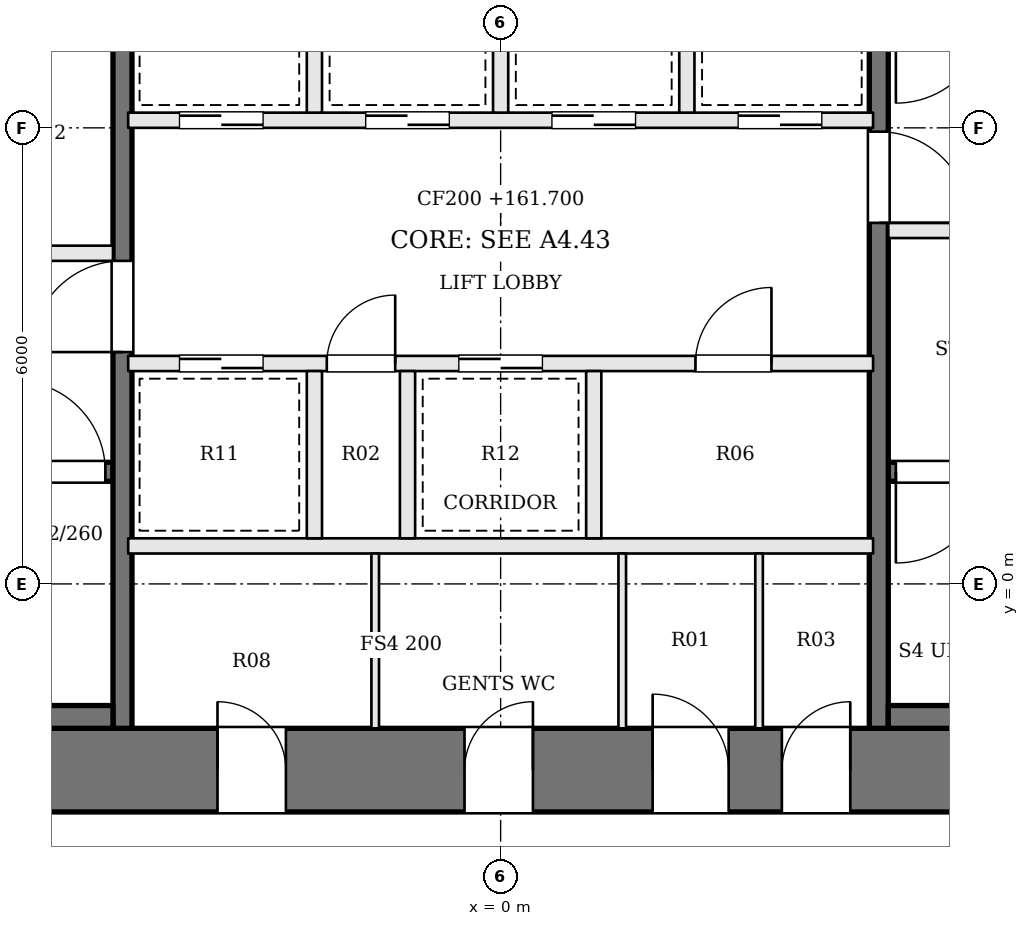
"""IFC4 building model, lengths in metres.
Left out: names, types, materials, properties, quantities, classifications, styles, units other than length and angle.
Written with IfcOpenShell. Run it as: python <this file> out.ifc"""

import sys

from ifc_helpers import new_model, si_unit, direction, frame, frame_2d, origin, place, context, subcontext, project, spatial, rectangle, extrude, element, fill, save


model = new_model("IFC4")
c1 = context("Model", 3, precision=1e-05, world=origin(), true_north=direction((0.0, 1.0)))
c2 = subcontext(c1, "Body", "Model", "MODEL_VIEW")
j1 = project(units=[si_unit("LENGTHUNIT", "METRE"), si_unit("PLANEANGLEUNIT", "RADIAN")], contexts=[c1])
p1 = place(None, origin())
s1 = spatial("IfcSite", under=j1, at=p1, CompositionType="ELEMENT")
p2 = place(p1, origin())
s2 = spatial("IfcBuilding", under=s1, at=p2, CompositionType="ELEMENT")
p3 = place(p2, frame((0.0, 0.0, 161.7)))
s3 = spatial("IfcBuildingStorey", under=s2, at=p3, CompositionType="ELEMENT", Elevation=161.7)
p4 = place(p3, frame((-13.0, -2.45, 0.0), z_axis=(0.0, 0.0, 1.0), x_axis=(1.0, 0.0, 0.0)))
e1 = element("IfcWall", 1, at=p4, inside=s3, PredefinedType="SHEAR", context=c2, shape_type="SweptSolid", body=[
    extrude(rectangle(XDim=26.0, YDim=1.1, at=frame_2d((13.0, 0.0))), origin(), (0.0, 0.0, 1.0), 3.9),
])
p5 = place(p4, frame((9.275, 0.0, 0.0)))
e2 = element("IfcOpeningElement", 2, at=p5, cuts=e1, PredefinedType="OPENING", context=c2, shape_type="SweptSolid", body=[
    extrude(rectangle(XDim=0.9, YDim=2.1, at=frame_2d((0.45, 1.05))), frame((0.0, 0.56, 0.0), z_axis=(0.0, -1.0, 0.0), x_axis=(1.0, 0.0, 0.0)), (0.0, 0.0, 1.0), 1.12),
])
p6 = place(p4, frame((12.525, 0.0, 0.0)))
e3 = element("IfcOpeningElement", 3, at=p6, cuts=e1, PredefinedType="OPENING", context=c2, shape_type="SweptSolid", body=[
    extrude(rectangle(XDim=0.9, YDim=2.1, at=frame_2d((0.45, 1.05))), frame((0.0, 0.56, 0.0), z_axis=(0.0, -1.0, 0.0), x_axis=(1.0, 0.0, 0.0)), (0.0, 0.0, 1.0), 1.12),
])
p7 = place(p4, frame((15.0, 0.0, 0.0)))
e4 = element("IfcOpeningElement", 4, at=p7, cuts=e1, PredefinedType="OPENING", context=c2, shape_type="SweptSolid", body=[
    extrude(rectangle(XDim=1.0, YDim=2.1, at=frame_2d((0.5, 1.05))), frame((0.0, 0.56, 0.0), z_axis=(0.0, -1.0, 0.0), x_axis=(1.0, 0.0, 0.0)), (0.0, 0.0, 1.0), 1.12),
])
p8 = place(p4, frame((16.7, 0.0, 0.0)))
e5 = element("IfcOpeningElement", 5, at=p8, cuts=e1, PredefinedType="OPENING", context=c2, shape_type="SweptSolid", body=[
    extrude(rectangle(XDim=0.9, YDim=2.1, at=frame_2d((0.45, 1.05))), frame((0.0, 0.56, 0.0), z_axis=(0.0, -1.0, 0.0), x_axis=(1.0, 0.0, 0.0)), (0.0, 0.0, 1.0), 1.12),
])
p9 = place(p3, frame((-11.9, 1.475, 0.0), z_axis=(0.0, 0.0, 1.0), x_axis=(1.0, 0.0, 0.0)))
e6 = element("IfcWall", 6, at=p9, inside=s3, PredefinedType="SOLIDWALL", context=c2, shape_type="SweptSolid", body=[
    extrude(rectangle(XDim=6.8, YDim=0.25, at=frame_2d((3.4, 0.0))), origin(), (0.0, 0.0, 1.0), 3.7),
])
p10 = place(p9, frame((5.5, 0.0, 0.0)))
e7 = element("IfcOpeningElement", 7, at=p10, cuts=e6, PredefinedType="OPENING", context=c2, shape_type="SweptSolid", body=[
    extrude(rectangle(XDim=1.2, YDim=2.1, at=frame_2d((0.6, 1.05))), frame((0.0, 0.135, 0.0), z_axis=(0.0, -1.0, 0.0), x_axis=(1.0, 0.0, 0.0)), (0.0, 0.0, 1.0), 0.27),
])
p11 = place(p3, frame((-11.9, 4.35, 0.0), z_axis=(0.0, 0.0, 1.0), x_axis=(1.0, 0.0, 0.0)))
e8 = element("IfcWall", 8, at=p11, inside=s3, PredefinedType="SOLIDWALL", context=c2, shape_type="SweptSolid", body=[
    extrude(rectangle(XDim=6.8, YDim=0.2, at=frame_2d((3.4, 0.0))), origin(), (0.0, 0.0, 1.0), 3.7),
])
p12 = place(p11, frame((4.1, 0.0, 0.0)))
e9 = element("IfcOpeningElement", 9, at=p12, cuts=e8, PredefinedType="OPENING", context=c2, shape_type="SweptSolid", body=[
    extrude(rectangle(XDim=1.2, YDim=2.1, at=frame_2d((0.6, 1.05))), frame((0.0, 0.11, 0.0), z_axis=(0.0, -1.0, 0.0), x_axis=(1.0, 0.0, 0.0)), (0.0, 0.0, 1.0), 0.22),
])
p13 = place(p11, frame((0.8, 0.0, 0.0)))
e10 = element("IfcOpeningElement", 10, at=p13, cuts=e8, PredefinedType="OPENING", context=c2, shape_type="SweptSolid", body=[
    extrude(rectangle(XDim=1.2, YDim=2.1, at=frame_2d((0.6, 1.05))), frame((0.0, 0.11, 0.0), z_axis=(0.0, -1.0, 0.0), x_axis=(1.0, 0.0, 0.0)), (0.0, 0.0, 1.0), 0.22),
])
p14 = place(p3, frame((11.9, 4.65, 0.0), z_axis=(0.0, 0.0, 1.0), x_axis=(-1.0, 0.0, 0.0)))
e11 = element("IfcWall", 11, at=p14, inside=s3, PredefinedType="SOLIDWALL", context=c2, shape_type="SweptSolid", body=[
    extrude(rectangle(XDim=6.8, YDim=0.2, at=frame_2d((3.4, 0.0))), origin(), (0.0, 0.0, 1.0), 3.7),
])
p15 = place(p14, frame((4.1, 0.0, 0.0)))
e12 = element("IfcOpeningElement", 12, at=p15, cuts=e11, PredefinedType="OPENING", context=c2, shape_type="SweptSolid", body=[
    extrude(rectangle(XDim=1.2, YDim=2.1, at=frame_2d((0.6, 1.05))), frame((0.0, 0.11, 0.0), z_axis=(0.0, -1.0, 0.0), x_axis=(1.0, 0.0, 0.0)), (0.0, 0.0, 1.0), 0.22),
])
p16 = place(p14, frame((0.8, 0.0, 0.0)))
e13 = element("IfcOpeningElement", 13, at=p16, cuts=e11, PredefinedType="OPENING", context=c2, shape_type="SweptSolid", body=[
    extrude(rectangle(XDim=1.2, YDim=2.1, at=frame_2d((0.6, 1.05))), frame((0.0, 0.11, 0.0), z_axis=(0.0, -1.0, 0.0), x_axis=(1.0, 0.0, 0.0)), (0.0, 0.0, 1.0), 0.22),
])
p17 = place(p3, frame((11.9, 1.475, 0.0), z_axis=(0.0, 0.0, 1.0), x_axis=(-1.0, 0.0, 0.0)))
e14 = element("IfcWall", 14, at=p17, inside=s3, PredefinedType="SOLIDWALL", context=c2, shape_type="SweptSolid", body=[
    extrude(rectangle(XDim=6.8, YDim=0.25, at=frame_2d((3.4, 0.0))), origin(), (0.0, 0.0, 1.0), 3.7),
])
p18 = place(p17, frame((5.5, 0.0, 0.0)))
e15 = element("IfcOpeningElement", 15, at=p18, cuts=e14, PredefinedType="OPENING", context=c2, shape_type="SweptSolid", body=[
    extrude(rectangle(XDim=1.2, YDim=2.1, at=frame_2d((0.6, 1.05))), frame((0.0, 0.135, 0.0), z_axis=(0.0, -1.0, 0.0), x_axis=(1.0, 0.0, 0.0)), (0.0, 0.0, 1.0), 0.27),
])
p19 = place(p3, frame((-4.975, -1.9, 0.0), z_axis=(0.0, 0.0, 1.0), x_axis=(0.0, 1.0, 0.0)))
e16 = element("IfcWall", 16, at=p19, inside=s3, PredefinedType="SOLIDWALL", context=c2, shape_type="SweptSolid", body=[
    extrude(rectangle(XDim=12.8, YDim=0.25, at=frame_2d((6.4, 0.0))), origin(), (0.0, 0.0, 1.0), 3.7),
])
p20 = place(p19, frame((4.95, 0.0, 0.0)))
e17 = element("IfcOpeningElement", 17, at=p20, cuts=e16, PredefinedType="OPENING", context=c2, shape_type="SweptSolid", body=[
    extrude(rectangle(XDim=1.2, YDim=2.1, at=frame_2d((0.6, 1.05))), frame((0.0, 0.135, 0.0), z_axis=(0.0, -1.0, 0.0), x_axis=(1.0, 0.0, 0.0)), (0.0, 0.0, 1.0), 0.27),
])
p21 = place(p3, frame((4.975, 10.9, 0.0), z_axis=(0.0, 0.0, 1.0), x_axis=(0.0, -1.0, 0.0)))
e18 = element("IfcWall", 18, at=p21, inside=s3, PredefinedType="SOLIDWALL", context=c2, shape_type="SweptSolid", body=[
    extrude(rectangle(XDim=12.8, YDim=0.25, at=frame_2d((6.4, 0.0))), origin(), (0.0, 0.0, 1.0), 3.7),
])
p22 = place(p21, frame((4.95, 0.0, 0.0)))
e19 = element("IfcOpeningElement", 19, at=p22, cuts=e18, PredefinedType="OPENING", context=c2, shape_type="SweptSolid", body=[
    extrude(rectangle(XDim=1.2, YDim=2.1, at=frame_2d((0.6, 1.05))), frame((0.0, 0.135, 0.0), z_axis=(0.0, -1.0, 0.0), x_axis=(1.0, 0.0, 0.0)), (0.0, 0.0, 1.0), 0.27),
])
for number, where, z_axis, x_axis in (
    (20, (-11.9, -1.75, 0.0), (0.0, 0.0, 1.0), (1.0, 0.0, 0.0)),
    (21, (11.9, -1.75, 0.0), (0.0, 0.0, 1.0), (-1.0, 0.0, 0.0)),
):
    element("IfcWall", number, at=place(p3, frame(where, z_axis=z_axis, x_axis=x_axis)), inside=s3, PredefinedType="SOLIDWALL", context=c2, shape_type="SweptSolid", body=[
        extrude(rectangle(XDim=6.8, YDim=0.3, at=frame_2d((3.4, 0.0))), origin(), (0.0, 0.0, 1.0), 3.7),
    ])
p23 = place(p3, frame((-4.9, 0.5, 0.0), z_axis=(0.0, 0.0, 1.0), x_axis=(1.0, 0.0, 0.0)))
e22 = element("IfcWall", 22, at=p23, inside=s3, PredefinedType="SOLIDWALL", context=c2, shape_type="SweptSolid", body=[
    extrude(rectangle(XDim=9.8, YDim=0.2, at=frame_2d((4.9, 0.0))), origin(), (0.0, 0.0, 1.0), 3.7),
])
p24 = place(p3, frame((-4.9, 2.9, 0.0), z_axis=(0.0, 0.0, 1.0), x_axis=(1.0, 0.0, 0.0)))
e23 = element("IfcWall", 23, at=p24, inside=s3, PredefinedType="SOLIDWALL", context=c2, shape_type="SweptSolid", body=[
    extrude(rectangle(XDim=9.8, YDim=0.2, at=frame_2d((4.9, 0.0))), origin(), (0.0, 0.0, 1.0), 3.7),
])
p25 = place(p24, frame((0.675, 0.0, 0.0)))
e24 = element("IfcOpeningElement", 24, at=p25, cuts=e23, PredefinedType="OPENING", context=c2, shape_type="SweptSolid", body=[
    extrude(rectangle(XDim=1.1, YDim=2.1, at=frame_2d((0.55, 1.05))), frame((0.0, 0.11, 0.0), z_axis=(0.0, -1.0, 0.0), x_axis=(1.0, 0.0, 0.0)), (0.0, 0.0, 1.0), 0.22),
])
p26 = place(p24, frame((2.613, 0.0, 0.0)))
e25 = element("IfcOpeningElement", 25, at=p26, cuts=e23, PredefinedType="OPENING", context=c2, shape_type="SweptSolid", body=[
    extrude(rectangle(XDim=0.9, YDim=2.1, at=frame_2d((0.45, 1.05))), frame((0.0, 0.11, 0.0), z_axis=(0.0, -1.0, 0.0), x_axis=(1.0, 0.0, 0.0)), (0.0, 0.0, 1.0), 0.22),
])
p27 = place(p24, frame((4.35, 0.0, 0.0)))
e26 = element("IfcOpeningElement", 26, at=p27, cuts=e23, PredefinedType="OPENING", context=c2, shape_type="SweptSolid", body=[
    extrude(rectangle(XDim=1.1, YDim=2.1, at=frame_2d((0.55, 1.05))), frame((0.0, 0.11, 0.0), z_axis=(0.0, -1.0, 0.0), x_axis=(1.0, 0.0, 0.0)), (0.0, 0.0, 1.0), 0.22),
])
p28 = place(p24, frame((7.463, 0.0, 0.0)))
e27 = element("IfcOpeningElement", 27, at=p28, cuts=e23, PredefinedType="OPENING", context=c2, shape_type="SweptSolid", body=[
    extrude(rectangle(XDim=1.0, YDim=2.1, at=frame_2d((0.5, 1.05))), frame((0.0, 0.11, 0.0), z_axis=(0.0, -1.0, 0.0), x_axis=(1.0, 0.0, 0.0)), (0.0, 0.0, 1.0), 0.22),
])
p29 = place(p3, frame((-4.9, 6.1, 0.0), z_axis=(0.0, 0.0, 1.0), x_axis=(1.0, 0.0, 0.0)))
e28 = element("IfcWall", 28, at=p29, inside=s3, PredefinedType="SOLIDWALL", context=c2, shape_type="SweptSolid", body=[
    extrude(rectangle(XDim=9.8, YDim=0.2, at=frame_2d((4.9, 0.0))), origin(), (0.0, 0.0, 1.0), 3.7),
])
p30 = place(p29, frame((0.675, 0.0, 0.0)))
e29 = element("IfcOpeningElement", 29, at=p30, cuts=e28, PredefinedType="OPENING", context=c2, shape_type="SweptSolid", body=[
    extrude(rectangle(XDim=1.1, YDim=2.1, at=frame_2d((0.55, 1.05))), frame((0.0, 0.11, 0.0), z_axis=(0.0, -1.0, 0.0), x_axis=(1.0, 0.0, 0.0)), (0.0, 0.0, 1.0), 0.22),
])
p31 = place(p29, frame((3.125, 0.0, 0.0)))
e30 = element("IfcOpeningElement", 30, at=p31, cuts=e28, PredefinedType="OPENING", context=c2, shape_type="SweptSolid", body=[
    extrude(rectangle(XDim=1.1, YDim=2.1, at=frame_2d((0.55, 1.05))), frame((0.0, 0.11, 0.0), z_axis=(0.0, -1.0, 0.0), x_axis=(1.0, 0.0, 0.0)), (0.0, 0.0, 1.0), 0.22),
])
p32 = place(p29, frame((5.575, 0.0, 0.0)))
e31 = element("IfcOpeningElement", 31, at=p32, cuts=e28, PredefinedType="OPENING", context=c2, shape_type="SweptSolid", body=[
    extrude(rectangle(XDim=1.1, YDim=2.1, at=frame_2d((0.55, 1.05))), frame((0.0, 0.11, 0.0), z_axis=(0.0, -1.0, 0.0), x_axis=(1.0, 0.0, 0.0)), (0.0, 0.0, 1.0), 0.22),
])
p33 = place(p29, frame((8.025, 0.0, 0.0)))
e32 = element("IfcOpeningElement", 32, at=p33, cuts=e28, PredefinedType="OPENING", context=c2, shape_type="SweptSolid", body=[
    extrude(rectangle(XDim=1.1, YDim=2.1, at=frame_2d((0.55, 1.05))), frame((0.0, 0.11, 0.0), z_axis=(0.0, -1.0, 0.0), x_axis=(1.0, 0.0, 0.0)), (0.0, 0.0, 1.0), 0.22),
])
for number, where, z_axis, x_axis in (
    (33, (-2.45, 0.6, 0.0), (0.0, 0.0, 1.0), (0.0, 1.0, 0.0)),
    (34, (-1.225, 0.6, 0.0), (0.0, 0.0, 1.0), (0.0, 1.0, 0.0)),
    (35, (1.225, 0.6, 0.0), (0.0, 0.0, 1.0), (0.0, 1.0, 0.0)),
    (36, (-2.45, 6.2, 0.0), (0.0, 0.0, 1.0), (0.0, 1.0, 0.0)),
    (37, (0.0, 6.2, 0.0), (0.0, 0.0, 1.0), (0.0, 1.0, 0.0)),
    (38, (2.45, 6.2, 0.0), (0.0, 0.0, 1.0), (0.0, 1.0, 0.0)),
):
    element("IfcWall", number, at=place(p3, frame(where, z_axis=z_axis, x_axis=x_axis)), inside=s3, PredefinedType="SOLIDWALL", context=c2, shape_type="SweptSolid", body=[
        extrude(rectangle(XDim=2.2, YDim=0.2, at=frame_2d((1.1, 0.0))), origin(), (0.0, 0.0, 1.0), 3.7),
    ])
for number, where, z_axis, x_axis in (
    (39, (-1.65, -1.9, 0.0), (0.0, 0.0, 1.0), (0.0, 1.0, 0.0)),
    (40, (1.6, -1.9, 0.0), (0.0, 0.0, 1.0), (0.0, 1.0, 0.0)),
    (41, (3.4, -1.9, 0.0), (0.0, 0.0, 1.0), (0.0, 1.0, 0.0)),
):
    element("IfcWall", number, at=place(p3, frame(where, z_axis=z_axis, x_axis=x_axis)), inside=s3, PredefinedType="PARTITIONING", context=c2, shape_type="SweptSolid", body=[
        extrude(rectangle(XDim=2.3, YDim=0.1, at=frame_2d((1.15, 0.0))), origin(), (0.0, 0.0, 1.0), 3.7),
    ])
p34 = place(p20, origin())
e42 = element("IfcDoor", 42, at=p34, inside=s3, OperationType="SINGLE_SWING_LEFT", PredefinedType="DOOR", context=c2, shape_type="SweptSolid", body=[
    extrude(rectangle(XDim=1.2, YDim=2.1, at=frame_2d((0.6, 1.05))), frame((0.0, 0.025, 0.0), z_axis=(0.0, -1.0, 0.0), x_axis=(1.0, 0.0, 0.0)), (0.0, 0.0, 1.0), 0.05),
])
fill(e17, e42)
p35 = place(p22, origin())
e43 = element("IfcDoor", 43, at=p35, inside=s3, OperationType="SINGLE_SWING_RIGHT", PredefinedType="DOOR", context=c2, shape_type="SweptSolid", body=[
    extrude(rectangle(XDim=1.2, YDim=2.1, at=frame_2d((0.6, 1.05))), frame((0.0, 0.025, 0.0), z_axis=(0.0, -1.0, 0.0), x_axis=(1.0, 0.0, 0.0)), (0.0, 0.0, 1.0), 0.05),
])
fill(e19, e43)
p36 = place(p10, origin())
e44 = element("IfcDoor", 44, at=p36, inside=s3, OperationType="SINGLE_SWING_LEFT", PredefinedType="DOOR", context=c2, shape_type="SweptSolid", body=[
    extrude(rectangle(XDim=1.2, YDim=2.1, at=frame_2d((0.6, 1.05))), frame((0.0, 0.025, 0.0), z_axis=(0.0, -1.0, 0.0), x_axis=(1.0, 0.0, 0.0)), (0.0, 0.0, 1.0), 0.05),
])
fill(e7, e44)
p37 = place(p18, origin())
e45 = element("IfcDoor", 45, at=p37, inside=s3, OperationType="SINGLE_SWING_RIGHT", PredefinedType="DOOR", context=c2, shape_type="SweptSolid", body=[
    extrude(rectangle(XDim=1.2, YDim=2.1, at=frame_2d((0.6, 1.05))), frame((0.0, 0.025, 0.0), z_axis=(0.0, -1.0, 0.0), x_axis=(1.0, 0.0, 0.0)), (0.0, 0.0, 1.0), 0.05),
])
fill(e15, e45)
p38 = place(p25, origin())
e46 = element("IfcDoor", 46, at=p38, inside=s3, OperationType="SLIDING_TO_RIGHT", PredefinedType="DOOR", context=c2, shape_type="SweptSolid", body=[
    extrude(rectangle(XDim=1.1, YDim=2.1, at=frame_2d((0.55, 1.05))), frame((0.0, 0.025, 0.0), z_axis=(0.0, -1.0, 0.0), x_axis=(1.0, 0.0, 0.0)), (0.0, 0.0, 1.0), 0.05),
])
fill(e24, e46)
p39 = place(p26, origin())
e47 = element("IfcDoor", 47, at=p39, inside=s3, OperationType="SINGLE_SWING_RIGHT", PredefinedType="DOOR", context=c2, shape_type="SweptSolid", body=[
    extrude(rectangle(XDim=0.9, YDim=2.1, at=frame_2d((0.45, 1.05))), frame((0.0, 0.025, 0.0), z_axis=(0.0, -1.0, 0.0), x_axis=(1.0, 0.0, 0.0)), (0.0, 0.0, 1.0), 0.05),
])
fill(e25, e47)
p40 = place(p27, origin())
e48 = element("IfcDoor", 48, at=p40, inside=s3, OperationType="SLIDING_TO_LEFT", PredefinedType="DOOR", context=c2, shape_type="SweptSolid", body=[
    extrude(rectangle(XDim=1.1, YDim=2.1, at=frame_2d((0.55, 1.05))), frame((0.0, 0.025, 0.0), z_axis=(0.0, -1.0, 0.0), x_axis=(1.0, 0.0, 0.0)), (0.0, 0.0, 1.0), 0.05),
])
fill(e26, e48)
p41 = place(p28, origin())
e49 = element("IfcDoor", 49, at=p41, inside=s3, OperationType="SINGLE_SWING_RIGHT", PredefinedType="DOOR", context=c2, shape_type="SweptSolid", body=[
    extrude(rectangle(XDim=1.0, YDim=2.1, at=frame_2d((0.5, 1.05))), frame((0.0, 0.025, 0.0), z_axis=(0.0, -1.0, 0.0), x_axis=(1.0, 0.0, 0.0)), (0.0, 0.0, 1.0), 0.05),
])
fill(e27, e49)
p42 = place(p30, origin())
e50 = element("IfcDoor", 50, at=p42, inside=s3, OperationType="SLIDING_TO_RIGHT", PredefinedType="DOOR", context=c2, shape_type="SweptSolid", body=[
    extrude(rectangle(XDim=1.1, YDim=2.1, at=frame_2d((0.55, 1.05))), frame((0.0, 0.025, 0.0), z_axis=(0.0, -1.0, 0.0), x_axis=(1.0, 0.0, 0.0)), (0.0, 0.0, 1.0), 0.05),
])
fill(e29, e50)
p43 = place(p31, origin())
e51 = element("IfcDoor", 51, at=p43, inside=s3, OperationType="SLIDING_TO_LEFT", PredefinedType="DOOR", context=c2, shape_type="SweptSolid", body=[
    extrude(rectangle(XDim=1.1, YDim=2.1, at=frame_2d((0.55, 1.05))), frame((0.0, 0.025, 0.0), z_axis=(0.0, -1.0, 0.0), x_axis=(1.0, 0.0, 0.0)), (0.0, 0.0, 1.0), 0.05),
])
fill(e30, e51)
p44 = place(p32, origin())
e52 = element("IfcDoor", 52, at=p44, inside=s3, OperationType="SLIDING_TO_RIGHT", PredefinedType="DOOR", context=c2, shape_type="SweptSolid", body=[
    extrude(rectangle(XDim=1.1, YDim=2.1, at=frame_2d((0.55, 1.05))), frame((0.0, 0.025, 0.0), z_axis=(0.0, -1.0, 0.0), x_axis=(1.0, 0.0, 0.0)), (0.0, 0.0, 1.0), 0.05),
])
fill(e31, e52)
p45 = place(p33, origin())
e53 = element("IfcDoor", 53, at=p45, inside=s3, OperationType="SLIDING_TO_LEFT", PredefinedType="DOOR", context=c2, shape_type="SweptSolid", body=[
    extrude(rectangle(XDim=1.1, YDim=2.1, at=frame_2d((0.55, 1.05))), frame((0.0, 0.025, 0.0), z_axis=(0.0, -1.0, 0.0), x_axis=(1.0, 0.0, 0.0)), (0.0, 0.0, 1.0), 0.05),
])
fill(e32, e53)
p46 = place(p5, origin())
e54 = element("IfcDoor", 54, at=p46, inside=s3, OperationType="SINGLE_SWING_LEFT", PredefinedType="DOOR", context=c2, shape_type="SweptSolid", body=[
    extrude(rectangle(XDim=0.9, YDim=2.1, at=frame_2d((0.45, 1.05))), frame((0.0, 0.025, 0.0), z_axis=(0.0, -1.0, 0.0), x_axis=(1.0, 0.0, 0.0)), (0.0, 0.0, 1.0), 0.05),
])
fill(e2, e54)
p47 = place(p6, origin())
e55 = element("IfcDoor", 55, at=p47, inside=s3, OperationType="SINGLE_SWING_RIGHT", PredefinedType="DOOR", context=c2, shape_type="SweptSolid", body=[
    extrude(rectangle(XDim=0.9, YDim=2.1, at=frame_2d((0.45, 1.05))), frame((0.0, 0.025, 0.0), z_axis=(0.0, -1.0, 0.0), x_axis=(1.0, 0.0, 0.0)), (0.0, 0.0, 1.0), 0.05),
])
fill(e3, e55)
p48 = place(p7, origin())
e56 = element("IfcDoor", 56, at=p48, inside=s3, OperationType="SINGLE_SWING_LEFT", PredefinedType="DOOR", context=c2, shape_type="SweptSolid", body=[
    extrude(rectangle(XDim=1.0, YDim=2.1, at=frame_2d((0.5, 1.05))), frame((0.0, 0.025, 0.0), z_axis=(0.0, -1.0, 0.0), x_axis=(1.0, 0.0, 0.0)), (0.0, 0.0, 1.0), 0.05),
])
fill(e4, e56)
p49 = place(p8, origin())
e57 = element("IfcDoor", 57, at=p49, inside=s3, OperationType="SINGLE_SWING_RIGHT", PredefinedType="DOOR", context=c2, shape_type="SweptSolid", body=[
    extrude(rectangle(XDim=0.9, YDim=2.1, at=frame_2d((0.45, 1.05))), frame((0.0, 0.025, 0.0), z_axis=(0.0, -1.0, 0.0), x_axis=(1.0, 0.0, 0.0)), (0.0, 0.0, 1.0), 0.05),
])
fill(e5, e57)
save(model, sys.argv[1])
